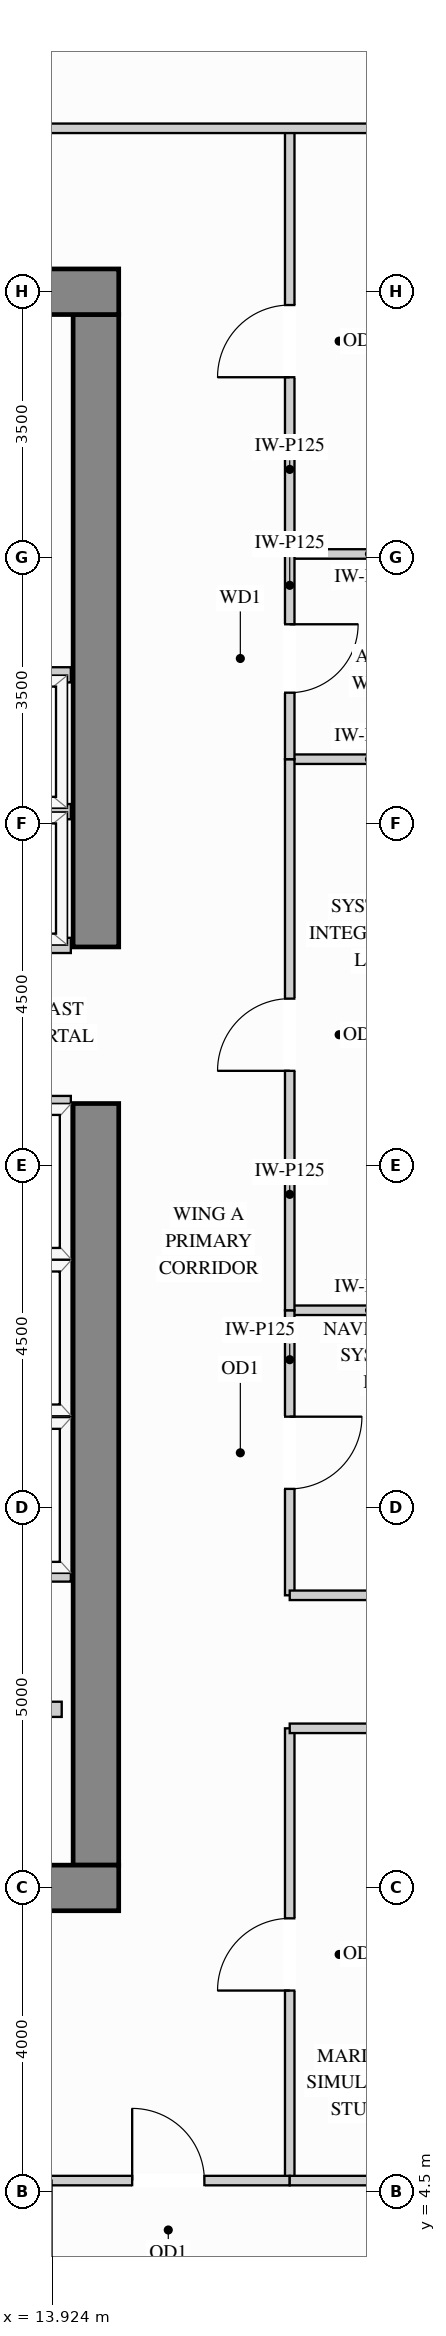
"""IFC4 building model, lengths in metres.
Left out: names, types, materials, properties, quantities, classifications, styles, units other than length and angle.
Written with IfcOpenShell. Run it as: python <this file> out.ifc"""

import sys

from ifc_helpers import new_model, si_unit, direction, frame, frame_2d, origin, place, context, subcontext, project, spatial, rectangle, extrude, source, transform, mapped, element, fill, save


model = new_model("IFC4")
c1 = context("Model", 3, precision=1e-05, world=origin(), true_north=direction((0.0, 1.0)))
c2 = subcontext(c1, "Body", "Model", "MODEL_VIEW")
j1 = project(units=[si_unit("LENGTHUNIT", "METRE"), si_unit("PLANEANGLEUNIT", "RADIAN")], contexts=[c1])
p1 = place(None, origin())
s1 = spatial("IfcSite", under=j1, at=p1, CompositionType="ELEMENT")
p2 = place(p1, origin())
s2 = spatial("IfcBuilding", under=s1, at=p2, CompositionType="ELEMENT")
p3 = place(p2, frame((0.0, 0.0, 143.1)))
s3 = spatial("IfcBuildingStorey", under=s2, at=p3, CompositionType="ELEMENT", Elevation=143.1)
m1 = source(origin(), c2, "Body", "SweptSolid", [
    extrude(rectangle(XDim=10.02, YDim=0.6, at=frame_2d((5.01, 0.0))), origin(), (0.0, 0.0, 1.0), 3.4),
])
p4 = place(p3, frame((14.5, 8.8, 0.0), z_axis=(0.0, 0.0, 1.0), x_axis=(0.0, 1.0, 0.0)))
e1 = element("IfcWall", 1, at=p4, inside=s3, PredefinedType="SHEAR", context=c2, shape_type="MappedRepresentation", body=[
    mapped(m1, transform((0.0, 0.0, 0.0), x_axis=(1.0, 0.0, 0.0), y_axis=(0.0, 1.0, 0.0), z_axis=(0.0, 0.0, 1.0))),
])
m2 = source(origin(), c2, "Body", "SweptSolid", [
    extrude(rectangle(XDim=8.32, YDim=0.6, at=frame_2d((4.16, 0.0))), origin(), (0.0, 0.0, 1.0), 3.4),
])
p5 = place(p3, frame((14.5, 20.88, 0.0), z_axis=(0.0, 0.0, 1.0), x_axis=(0.0, 1.0, 0.0)))
e2 = element("IfcWall", 2, at=p5, inside=s3, PredefinedType="SHEAR", context=c2, shape_type="MappedRepresentation", body=[
    mapped(m2, transform((0.0, 0.0, 0.0), x_axis=(1.0, 0.0, 0.0), y_axis=(0.0, 1.0, 0.0), z_axis=(0.0, 0.0, 1.0))),
])
m3 = source(origin(), c2, "Body", "SweptSolid", [
    extrude(rectangle(XDim=10.6, YDim=0.6, at=frame_2d((5.3, 0.0))), origin(), (0.0, 0.0, 1.0), 3.4),
])
for number, where, z_axis, x_axis in (
    (3, (4.2, 29.5, 0.0), (0.0, 0.0, 1.0), (1.0, 0.0, 0.0)),
    (4, (4.2, 8.5, 0.0), (0.0, 0.0, 1.0), (1.0, 0.0, 0.0)),
):
    element("IfcWall", number, at=place(p3, frame(where, z_axis=z_axis, x_axis=x_axis)), inside=s3, PredefinedType="SHEAR", context=c2, shape_type="MappedRepresentation", body=[
        mapped(m3, transform((0.0, 0.0, 0.0), x_axis=(1.0, 0.0, 0.0), y_axis=(0.0, 1.0, 0.0), z_axis=(0.0, 0.0, 1.0))),
    ])
m4 = source(origin(), c2, "Body", "SweptSolid", [
    extrude(rectangle(XDim=2.1, YDim=0.125, at=frame_2d((1.05, 0.0))), origin(), (0.0, 0.0, 1.0), 3.385),
])
p6 = place(p3, frame((17.05, 16.1, 0.0), z_axis=(0.0, 0.0, 1.0), x_axis=(1.0, 0.0, 0.0)))
e5 = element("IfcWall", 5, at=p6, inside=s3, PredefinedType="PARTITIONING", context=c2, shape_type="MappedRepresentation", body=[
    mapped(m4, transform((0.0, 0.0, 0.0), x_axis=(1.0, 0.0, 0.0), y_axis=(0.0, 1.0, 0.0), z_axis=(0.0, 0.0, 1.0))),
])
m5 = source(origin(), c2, "Body", "SweptSolid", [
    extrude(rectangle(XDim=2.098, YDim=0.125, at=frame_2d((1.049, 0.0))), origin(), (0.0, 0.0, 1.0), 3.385),
])
for number, where, z_axis, x_axis in (
    (6, (17.05, 23.35, 0.0), (0.0, 0.0, 1.0), (1.0, 0.0, 0.0)),
    (7, (17.05, 26.05, 0.0), (0.0, 0.0, 1.0), (1.0, 0.0, 0.0)),
):
    element("IfcWall", number, at=place(p3, frame(where, z_axis=z_axis, x_axis=x_axis)), inside=s3, PredefinedType="PARTITIONING", context=c2, shape_type="MappedRepresentation", body=[
        mapped(m5, transform((0.0, 0.0, 0.0), x_axis=(1.0, 0.0, 0.0), y_axis=(0.0, 1.0, 0.0), z_axis=(0.0, 0.0, 1.0))),
    ])
p7 = place(p3, frame((17.05, 12.35, 0.0), z_axis=(0.0, 0.0, 1.0), x_axis=(0.0, 1.0, 0.0)))
e8 = element("IfcWall", 8, at=p7, inside=s3, PredefinedType="PARTITIONING", context=c2, shape_type="SweptSolid", body=[
    extrude(rectangle(XDim=3.75, YDim=0.125, at=frame_2d((1.875, 0.0))), origin(), (0.0, 0.0, 1.0), 3.385),
])
p8 = place(p7, frame((1.4, 0.0, 0.0)))
e9 = element("IfcOpeningElement", 9, at=p8, cuts=e8, PredefinedType="OPENING", context=c2, shape_type="SweptSolid", body=[
    extrude(rectangle(XDim=0.95, YDim=2.15, at=frame_2d((0.475, 1.075))), frame((0.0, 0.073, 0.0), z_axis=(0.0, -1.0, 0.0), x_axis=(1.0, 0.0, 0.0)), (0.0, 0.0, 1.0), 0.145),
])
p9 = place(p3, frame((17.05, 16.1, 0.0), z_axis=(0.0, 0.0, 1.0), x_axis=(0.0, 1.0, 0.0)))
e10 = element("IfcWall", 10, at=p9, inside=s3, PredefinedType="PARTITIONING", context=c2, shape_type="SweptSolid", body=[
    extrude(rectangle(XDim=7.25, YDim=0.125, at=frame_2d((3.625, 0.0))), origin(), (0.0, 0.0, 1.0), 3.385),
])
p10 = place(p9, frame((3.15, 0.0, 0.0)))
e11 = element("IfcOpeningElement", 11, at=p10, cuts=e10, PredefinedType="OPENING", context=c2, shape_type="SweptSolid", body=[
    extrude(rectangle(XDim=0.95, YDim=2.15, at=frame_2d((0.475, 1.075))), frame((0.0, 0.073, 0.0), z_axis=(0.0, -1.0, 0.0), x_axis=(1.0, 0.0, 0.0)), (0.0, 0.0, 1.0), 0.145),
])
p11 = place(p3, frame((17.05, 26.05, 0.0), z_axis=(0.0, 0.0, 1.0), x_axis=(0.0, 1.0, 0.0)))
e12 = element("IfcWall", 12, at=p11, inside=s3, PredefinedType="PARTITIONING", context=c2, shape_type="SweptSolid", body=[
    extrude(rectangle(XDim=5.6, YDim=0.125, at=frame_2d((2.8, 0.0))), origin(), (0.0, 0.0, 1.0), 3.385),
])
p12 = place(p11, frame((2.325, 0.0, 0.0)))
e13 = element("IfcOpeningElement", 13, at=p12, cuts=e12, PredefinedType="OPENING", context=c2, shape_type="SweptSolid", body=[
    extrude(rectangle(XDim=0.95, YDim=2.15, at=frame_2d((0.475, 1.075))), frame((0.0, 0.073, 0.0), z_axis=(0.0, -1.0, 0.0), x_axis=(1.0, 0.0, 0.0)), (0.0, 0.0, 1.0), 0.145),
])
p13 = place(p3, frame((17.05, 4.65, 0.0), z_axis=(0.0, 0.0, 1.0), x_axis=(0.0, 1.0, 0.0)))
e14 = element("IfcWall", 14, at=p13, inside=s3, PredefinedType="PARTITIONING", context=c2, shape_type="SweptSolid", body=[
    extrude(rectangle(XDim=5.95, YDim=0.125, at=frame_2d((2.975, 0.0))), origin(), (0.0, 0.0, 1.0), 3.385),
])
p14 = place(p13, frame((2.5, 0.0, 0.0)))
e15 = element("IfcOpeningElement", 15, at=p14, cuts=e14, PredefinedType="OPENING", context=c2, shape_type="SweptSolid", body=[
    extrude(rectangle(XDim=0.95, YDim=2.15, at=frame_2d((0.475, 1.075))), frame((0.0, 0.073, 0.0), z_axis=(0.0, -1.0, 0.0), x_axis=(1.0, 0.0, 0.0)), (0.0, 0.0, 1.0), 0.145),
])
p15 = place(p3, frame((17.05, 23.35, 0.0), z_axis=(0.0, 0.0, 1.0), x_axis=(0.0, 1.0, 0.0)))
e16 = element("IfcWall", 16, at=p15, inside=s3, PredefinedType="PARTITIONING", context=c2, shape_type="SweptSolid", body=[
    extrude(rectangle(XDim=2.7, YDim=0.125, at=frame_2d((1.35, 0.0))), origin(), (0.0, 0.0, 1.0), 3.385),
])
p16 = place(p15, frame((0.875, 0.0, 0.0)))
e17 = element("IfcOpeningElement", 17, at=p16, cuts=e16, PredefinedType="OPENING", context=c2, shape_type="SweptSolid", body=[
    extrude(rectangle(XDim=0.9, YDim=2.15, at=frame_2d((0.45, 1.075))), frame((0.0, 0.073, 0.0), z_axis=(0.0, -1.0, 0.0), x_axis=(1.0, 0.0, 0.0)), (0.0, 0.0, 1.0), 0.145),
])
m6 = source(origin(), c2, "Body", "SweptSolid", [
    extrude(rectangle(XDim=12.598, YDim=0.125, at=frame_2d((6.299, 0.0))), origin(), (0.0, 0.0, 1.0), 2.848),
])
p17 = place(p3, frame((6.55, 31.65, 0.0), z_axis=(0.0, 0.0, 1.0), x_axis=(1.0, 0.0, 0.0)))
e18 = element("IfcWall", 18, at=p17, inside=s3, PredefinedType="PARTITIONING", context=c2, shape_type="MappedRepresentation", body=[
    mapped(m6, transform((0.0, 0.0, 0.0), x_axis=(1.0, 0.0, 0.0), y_axis=(0.0, 1.0, 0.0), z_axis=(0.0, 0.0, 1.0))),
])
m7 = source(origin(), c2, "Body", "SweptSolid", [
    extrude(rectangle(XDim=2.45, YDim=0.125, at=frame_2d((1.225, 0.0))), origin(), (0.0, 0.0, 1.0), 3.385),
])
for number, where, z_axis, x_axis in (
    (19, (17.05, 12.35, 0.0), (0.0, 0.0, 1.0), (1.0, 0.0, 0.0)),
    (20, (17.05, 10.6, 0.0), (0.0, 0.0, 1.0), (1.0, 0.0, 0.0)),
):
    element("IfcWall", number, at=place(p3, frame(where, z_axis=z_axis, x_axis=x_axis)), inside=s3, PredefinedType="PARTITIONING", context=c2, shape_type="MappedRepresentation", body=[
        mapped(m7, transform((0.0, 0.0, 0.0), x_axis=(1.0, 0.0, 0.0), y_axis=(0.0, 1.0, 0.0), z_axis=(0.0, 0.0, 1.0))),
    ])
p18 = place(p3, frame((13.854, 4.65, 0.0), z_axis=(0.0, 0.0, 1.0), x_axis=(1.0, 0.0, 0.0)))
e21 = element("IfcWall", 21, at=p18, inside=s3, PredefinedType="PARTITIONING", context=c2, shape_type="SweptSolid", body=[
    extrude(rectangle(XDim=3.196, YDim=0.125, at=frame_2d((1.598, 0.0))), origin(), (0.0, 0.0, 1.0), 2.848),
])
p19 = place(p18, frame((1.123, 0.0, 0.0)))
e22 = element("IfcOpeningElement", 22, at=p19, cuts=e21, PredefinedType="OPENING", context=c2, shape_type="SweptSolid", body=[
    extrude(rectangle(XDim=0.95, YDim=2.15, at=frame_2d((0.475, 1.075))), frame((0.0, 0.073, 0.0), z_axis=(0.0, -1.0, 0.0), x_axis=(1.0, 0.0, 0.0)), (0.0, 0.0, 1.0), 0.145),
])
m8 = source(origin(), c2, "Body", "SweptSolid", [
    extrude(rectangle(XDim=2.1, YDim=0.125, at=frame_2d((1.05, 0.0))), origin(), (0.0, 0.0, 1.0), 2.848),
])
p20 = place(p3, frame((17.05, 4.65, 0.0), z_axis=(0.0, 0.0, 1.0), x_axis=(1.0, 0.0, 0.0)))
e23 = element("IfcWall", 23, at=p20, inside=s3, PredefinedType="PARTITIONING", context=c2, shape_type="MappedRepresentation", body=[
    mapped(m8, transform((0.0, 0.0, 0.0), x_axis=(1.0, 0.0, 0.0), y_axis=(0.0, 1.0, 0.0), z_axis=(0.0, 0.0, 1.0))),
])
m9 = source(origin(), c2, "Body", "SweptSolid", [
    extrude(rectangle(XDim=1.63, YDim=0.2, at=frame_2d((0.815, 0.0))), origin(), (0.0, 0.0, 1.0), 3.385),
])
p21 = place(p3, frame((12.42, 10.85, 0.0), z_axis=(0.0, 0.0, 1.0), x_axis=(1.0, 0.0, 0.0)))
e24 = element("IfcWall", 24, at=p21, inside=s3, PredefinedType="PARTITIONING", context=c2, shape_type="MappedRepresentation", body=[
    mapped(m9, transform((0.0, 0.0, 0.0), x_axis=(1.0, 0.0, 0.0), y_axis=(0.0, 1.0, 0.0), z_axis=(0.0, 0.0, 1.0))),
])
m10 = source(origin(), c2, "Body", "SweptSolid", [
    extrude(rectangle(XDim=2.34, YDim=0.2, at=frame_2d((1.17, 0.0))), origin(), (0.0, 0.0, 1.0), 3.385),
])
for number, where, z_axis, x_axis in (
    (25, (11.83, 22.66, 0.0), (0.0, 0.0, 1.0), (1.0, 0.0, 0.0)),
    (26, (11.83, 20.9, 0.0), (0.0, 0.0, 1.0), (1.0, 0.0, 0.0)),
    (27, (11.83, 24.46, 0.0), (0.0, 0.0, 1.0), (1.0, 0.0, 0.0)),
):
    element("IfcWall", number, at=place(p3, frame(where, z_axis=z_axis, x_axis=x_axis)), inside=s3, PredefinedType="PARTITIONING", context=c2, shape_type="MappedRepresentation", body=[
        mapped(m10, transform((0.0, 0.0, 0.0), x_axis=(1.0, 0.0, 0.0), y_axis=(0.0, 1.0, 0.0), z_axis=(0.0, 0.0, 1.0))),
    ])
m11 = source(origin(), c2, "Body", "SweptSolid", [
    extrude(rectangle(XDim=1.94, YDim=0.2, at=frame_2d((0.97, 0.0))), origin(), (0.0, 0.0, 1.0), 3.385),
])
for number, where, z_axis, x_axis in (
    (28, (12.23, 14.7, 0.0), (0.0, 0.0, 1.0), (1.0, 0.0, 0.0)),
    (29, (12.23, 12.63, 0.0), (0.0, 0.0, 1.0), (1.0, 0.0, 0.0)),
    (30, (12.23, 16.77, 0.0), (0.0, 0.0, 1.0), (1.0, 0.0, 0.0)),
    (31, (12.23, 18.82, 0.0), (0.0, 0.0, 1.0), (1.0, 0.0, 0.0)),
):
    element("IfcWall", number, at=place(p3, frame(where, z_axis=z_axis, x_axis=x_axis)), inside=s3, PredefinedType="PARTITIONING", context=c2, shape_type="MappedRepresentation", body=[
        mapped(m11, transform((0.0, 0.0, 0.0), x_axis=(1.0, 0.0, 0.0), y_axis=(0.0, 1.0, 0.0), z_axis=(0.0, 0.0, 1.0))),
    ])
m12 = source(origin(), c2, "Body", "SweptSolid", [
    extrude(rectangle(XDim=0.95, YDim=2.15, at=frame_2d((0.475, 1.075))), frame((0.0, 0.025, 0.0), z_axis=(0.0, -1.0, 0.0), x_axis=(1.0, 0.0, 0.0)), (0.0, 0.0, 1.0), 0.05),
])
p22 = place(p14, origin())
e32 = element("IfcDoor", 32, at=p22, inside=s3, OperationType="SINGLE_SWING_LEFT", PredefinedType="DOOR", context=c2, shape_type="MappedRepresentation", body=[
    mapped(m12, transform((0.0, 0.0, 0.0), x_axis=(1.0, 0.0, 0.0), y_axis=(0.0, 1.0, 0.0), z_axis=(0.0, 0.0, 1.0))),
])
fill(e15, e32)
p23 = place(p8, origin())
e33 = element("IfcDoor", 33, at=p23, inside=s3, OperationType="SINGLE_SWING_RIGHT", PredefinedType="DOOR", context=c2, shape_type="MappedRepresentation", body=[
    mapped(m12, transform((0.0, 0.0, 0.0), x_axis=(1.0, 0.0, 0.0), y_axis=(0.0, 1.0, 0.0), z_axis=(0.0, 0.0, 1.0))),
])
fill(e9, e33)
p24 = place(p10, origin())
e34 = element("IfcDoor", 34, at=p24, inside=s3, OperationType="SINGLE_SWING_LEFT", PredefinedType="DOOR", context=c2, shape_type="MappedRepresentation", body=[
    mapped(m12, transform((0.0, 0.0, 0.0), x_axis=(1.0, 0.0, 0.0), y_axis=(0.0, 1.0, 0.0), z_axis=(0.0, 0.0, 1.0))),
])
fill(e11, e34)
p25 = place(p12, origin())
e35 = element("IfcDoor", 35, at=p25, inside=s3, OperationType="SINGLE_SWING_LEFT", PredefinedType="DOOR", context=c2, shape_type="MappedRepresentation", body=[
    mapped(m12, transform((0.0, 0.0, 0.0), x_axis=(1.0, 0.0, 0.0), y_axis=(0.0, 1.0, 0.0), z_axis=(0.0, 0.0, 1.0))),
])
fill(e13, e35)
p26 = place(p19, origin())
e36 = element("IfcDoor", 36, at=p26, inside=s3, OperationType="SINGLE_SWING_LEFT", PredefinedType="DOOR", context=c2, shape_type="MappedRepresentation", body=[
    mapped(m12, transform((0.0, 0.0, 0.0), x_axis=(1.0, 0.0, 0.0), y_axis=(0.0, 1.0, 0.0), z_axis=(0.0, 0.0, 1.0))),
])
fill(e22, e36)
m13 = source(origin(), c2, "Body", "SweptSolid", [
    extrude(rectangle(XDim=0.9, YDim=2.15, at=frame_2d((0.45, 1.075))), frame((0.0, 0.025, 0.0), z_axis=(0.0, -1.0, 0.0), x_axis=(1.0, 0.0, 0.0)), (0.0, 0.0, 1.0), 0.05),
])
p27 = place(p16, origin())
e37 = element("IfcDoor", 37, at=p27, inside=s3, OperationType="SINGLE_SWING_RIGHT", PredefinedType="DOOR", context=c2, shape_type="MappedRepresentation", body=[
    mapped(m13, transform((0.0, 0.0, 0.0), x_axis=(1.0, 0.0, 0.0), y_axis=(0.0, 1.0, 0.0), z_axis=(0.0, 0.0, 1.0))),
])
fill(e17, e37)
save(model, sys.argv[1])
